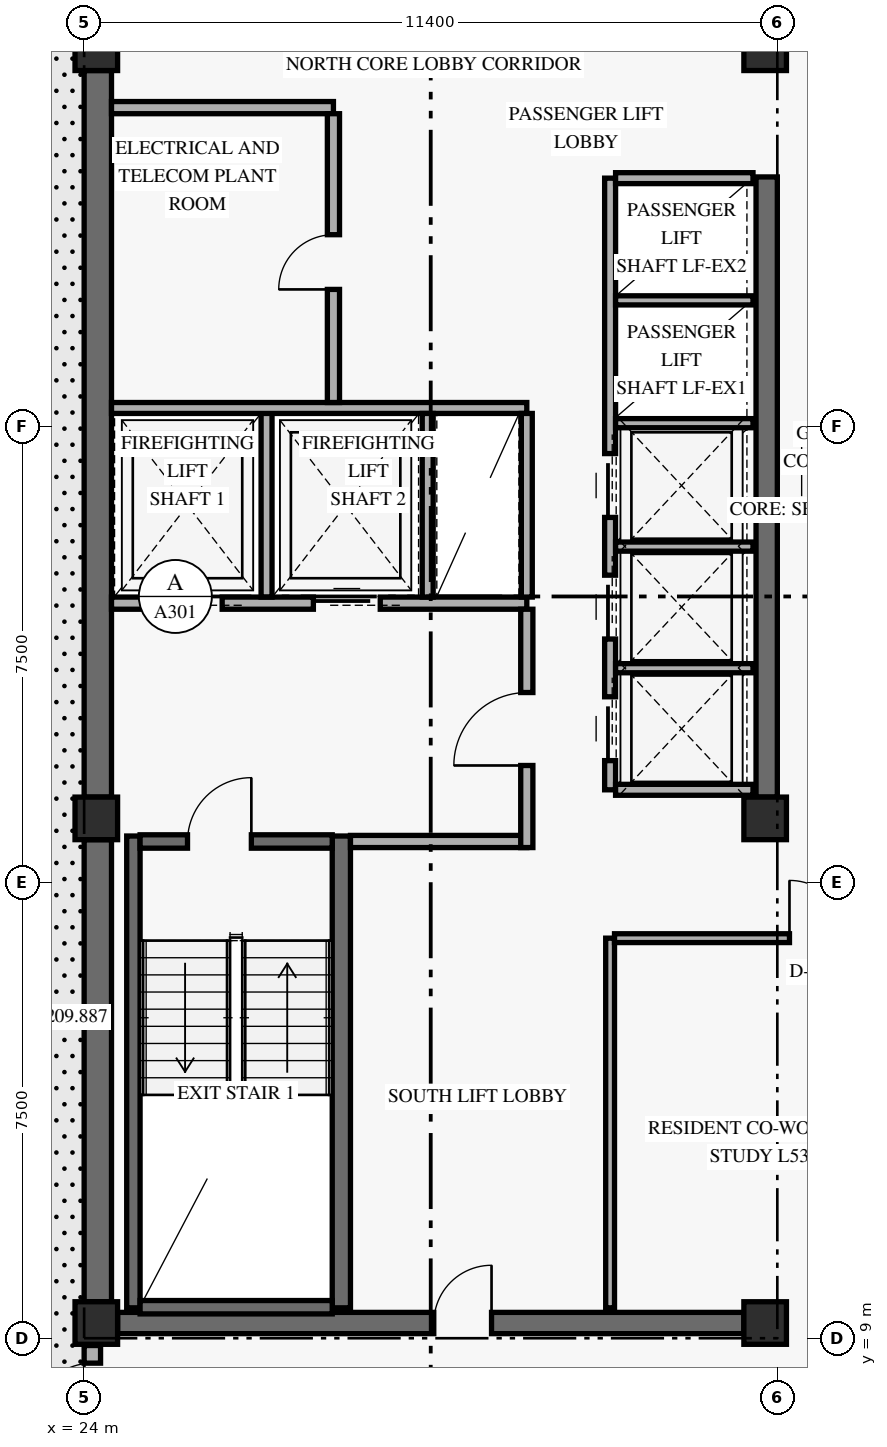
"""IFC4 building model, lengths in metres.
Left out: names, types, materials, properties, quantities, classifications, styles, units other than length and angle.
Written with IfcOpenShell. Run it as: python <this file> out.ifc"""

import sys

from ifc_helpers import new_model, si_unit, direction, frame, frame_2d, origin, origin_2d, place, context, subcontext, project, spatial, rectangle, extrude, element, fill, save


model = new_model("IFC4")
c1 = context("Model", 3, precision=1e-05, world=origin(), true_north=direction((0.0, 1.0)))
c2 = subcontext(c1, "Body", "Model", "MODEL_VIEW")
j1 = project(units=[si_unit("LENGTHUNIT", "METRE"), si_unit("PLANEANGLEUNIT", "RADIAN")], contexts=[c1])
p1 = place(None, origin())
s1 = spatial("IfcSite", under=j1, at=p1, CompositionType="ELEMENT")
p2 = place(p1, origin())
s2 = spatial("IfcBuilding", under=s1, at=p2, CompositionType="ELEMENT")
p3 = place(p2, frame((0.0, 0.0, 205.8)))
s3 = spatial("IfcBuildingStorey", under=s2, at=p3, CompositionType="ELEMENT", Elevation=205.8)
p4 = place(p3, frame((24.225, 9.6, 0.0), z_axis=(0.0, 0.0, 1.0), x_axis=(0.0, 1.0, 0.0)))
e1 = element("IfcWall", 1, at=p4, inside=s3, PredefinedType="SHEAR", context=c2, shape_type="SweptSolid", body=[
    extrude(rectangle(XDim=7.6, YDim=0.45, at=frame_2d((3.8, 0.0))), origin(), (0.0, 0.0, 1.0), 2.821),
])
p5 = place(p3, frame((24.225, 17.9, 0.0), z_axis=(0.0, 0.0, 1.0), x_axis=(0.0, 1.0, 0.0)))
e2 = element("IfcWall", 2, at=p5, inside=s3, PredefinedType="SHEAR", context=c2, shape_type="SweptSolid", body=[
    extrude(rectangle(XDim=11.95, YDim=0.45, at=frame_2d((5.975, 0.0))), origin(), (0.0, 0.0, 1.0), 2.821),
])
p6 = place(p3, frame((35.225, 17.9, 0.0), z_axis=(0.0, 0.0, 1.0), x_axis=(0.0, 1.0, 0.0)))
e3 = element("IfcWall", 3, at=p6, inside=s3, PredefinedType="SHEAR", context=c2, shape_type="SweptSolid", body=[
    extrude(rectangle(XDim=10.2, YDim=0.35, at=frame_2d((5.1, 0.0))), origin(), (0.0, 0.0, 1.0), 2.821),
])
p7 = place(p3, frame((24.55, 9.25, 0.0), z_axis=(0.0, 0.0, 1.0), x_axis=(1.0, 0.0, 0.0)))
e4 = element("IfcWall", 4, at=p7, inside=s3, PredefinedType="SHEAR", context=c2, shape_type="SweptSolid", body=[
    extrude(rectangle(XDim=10.3, YDim=0.35, at=frame_2d((5.15, 0.0))), origin(), (0.0, 0.0, 1.0), 3.36),
])
p8 = place(p7, frame((5.2, 0.0, 0.0)))
e5 = element("IfcOpeningElement", 5, at=p8, cuts=e4, PredefinedType="OPENING", context=c2, shape_type="SweptSolid", body=[
    extrude(rectangle(XDim=0.95, YDim=2.15, at=frame_2d((0.475, 1.075))), frame((0.0, 0.185, 0.0), z_axis=(0.0, -1.0, 0.0), x_axis=(1.0, 0.0, 0.0)), (0.0, 0.0, 1.0), 0.37),
])
p9 = place(p3, frame((24.81, 9.5, 0.0), z_axis=(0.0, 0.0, 1.0), x_axis=(0.0, 1.0, 0.0)))
e6 = element("IfcWall", 6, at=p9, inside=s3, PredefinedType="SHEAR", context=c2, shape_type="SweptSolid", body=[
    extrude(rectangle(XDim=7.76, YDim=0.22, at=frame_2d((3.88, 0.0))), origin(), (0.0, 0.0, 1.0), 3.36),
])
p10 = place(p3, frame((28.23, 9.5, 0.0), z_axis=(0.0, 0.0, 1.0), x_axis=(0.0, 1.0, 0.0)))
e7 = element("IfcWall", 7, at=p10, inside=s3, PredefinedType="SHEAR", context=c2, shape_type="SweptSolid", body=[
    extrude(rectangle(XDim=7.76, YDim=0.3, at=frame_2d((3.88, 0.0))), origin(), (0.0, 0.0, 1.0), 3.36),
])
p11 = place(p3, frame((24.92, 9.51, 0.0), z_axis=(0.0, 0.0, 1.0), x_axis=(1.0, 0.0, 0.0)))
e8 = element("IfcWall", 8, at=p11, inside=s3, PredefinedType="SHEAR", context=c2, shape_type="SweptSolid", body=[
    extrude(rectangle(XDim=3.16, YDim=0.22, at=frame_2d((1.58, 0.0))), origin(), (0.0, 0.0, 1.0), 3.36),
])
p12 = place(p3, frame((24.92, 17.17, 0.0), z_axis=(0.0, 0.0, 1.0), x_axis=(1.0, 0.0, 0.0)))
e9 = element("IfcWall", 9, at=p12, inside=s3, PredefinedType="SHEAR", context=c2, shape_type="SweptSolid", body=[
    extrude(rectangle(XDim=3.16, YDim=0.22, at=frame_2d((1.58, 0.0))), origin(), (0.0, 0.0, 1.0), 3.36),
])
p13 = place(p12, frame((0.78, 0.0, 0.0)))
e10 = element("IfcOpeningElement", 10, at=p13, cuts=e9, PredefinedType="OPENING", context=c2, shape_type="SweptSolid", body=[
    extrude(rectangle(XDim=1.05, YDim=2.15, at=frame_2d((0.525, 1.075))), frame((0.0, 0.12, 0.0), z_axis=(0.0, -1.0, 0.0), x_axis=(1.0, 0.0, 0.0)), (0.0, 0.0, 1.0), 0.24),
])
for number, where, z_axis, x_axis in (
    (11, (24.2, 9.25, 0.0), (0.0, 0.0, 1.0), (1.0, 0.0, 0.0)),
    (12, (24.2, 17.55, 0.0), (0.0, 0.0, 1.0), (1.0, 0.0, 0.0)),
    (13, (24.2, 30.2, 0.0), (0.0, 0.0, 1.0), (1.0, 0.0, 0.0)),
    (14, (35.2, 9.25, 0.0), (0.0, 0.0, 1.0), (1.0, 0.0, 0.0)),
    (15, (35.2, 17.55, 0.0), (0.0, 0.0, 1.0), (1.0, 0.0, 0.0)),
    (16, (35.2, 30.2, 0.0), (0.0, 0.0, 1.0), (1.0, 0.0, 0.0)),
):
    element("IfcColumn", number, at=place(p3, frame(where, z_axis=z_axis, x_axis=x_axis)), inside=s3, PredefinedType="COLUMN", context=c2, shape_type="SweptSolid", body=[
        extrude(rectangle(XDim=0.7, YDim=0.7, at=origin_2d()), origin(), (0.0, 0.0, 1.0), 3.6),
    ])
p14 = place(p3, frame((24.135, 7.32, 0.0), z_axis=(0.0, 0.0, 1.0), x_axis=(0.0, 1.0, 0.0)))
e17 = element("IfcWall", 17, at=p14, inside=s3, PredefinedType="SOLIDWALL", context=c2, shape_type="SweptSolid", body=[
    extrude(rectangle(XDim=1.56, YDim=0.27, at=frame_2d((0.78, 0.0))), origin(), (0.0, 0.0, 1.0), 2.803),
])
p15 = place(p14, frame((0.29, 0.0, 0.0)))
e18 = element("IfcOpeningElement", 18, at=p15, cuts=e17, PredefinedType="OPENING", context=c2, shape_type="SweptSolid", body=[
    extrude(rectangle(XDim=0.98, YDim=2.12, at=frame_2d((0.49, 1.06))), frame((0.0, 0.145, 0.0), z_axis=(0.0, -1.0, 0.0), x_axis=(1.0, 0.0, 0.0)), (0.0, 0.0, 1.0), 0.29),
])
p16 = place(p3, frame((24.45, 21.09, 0.0), z_axis=(0.0, 0.0, 1.0), x_axis=(1.0, 0.0, 0.0)))
e19 = element("IfcWall", 19, at=p16, inside=s3, PredefinedType="STANDARD", context=c2, shape_type="SweptSolid", body=[
    extrude(rectangle(XDim=6.83, YDim=0.2, at=frame_2d((3.415, 0.0))), origin(), (0.0, 0.0, 1.0), 3.36),
])
p17 = place(p16, frame((0.72, 0.0, 0.0)))
e20 = element("IfcOpeningElement", 20, at=p17, cuts=e19, PredefinedType="OPENING", context=c2, shape_type="SweptSolid", body=[
    extrude(rectangle(XDim=1.1, YDim=2.2, at=frame_2d((0.55, 1.1))), frame((0.0, 0.11, 0.0), z_axis=(0.0, -1.0, 0.0), x_axis=(1.0, 0.0, 0.0)), (0.0, 0.0, 1.0), 0.22),
])
p18 = place(p16, frame((3.32, 0.0, 0.0)))
e21 = element("IfcOpeningElement", 21, at=p18, cuts=e19, PredefinedType="OPENING", context=c2, shape_type="SweptSolid", body=[
    extrude(rectangle(XDim=1.1, YDim=2.2, at=frame_2d((0.55, 1.1))), frame((0.0, 0.11, 0.0), z_axis=(0.0, -1.0, 0.0), x_axis=(1.0, 0.0, 0.0)), (0.0, 0.0, 1.0), 0.22),
])
p19 = place(p3, frame((28.38, 17.17, 0.0), z_axis=(0.0, 0.0, 1.0), x_axis=(1.0, 0.0, 0.0)))
e22 = element("IfcWall", 22, at=p19, inside=s3, PredefinedType="STANDARD", context=c2, shape_type="SweptSolid", body=[
    extrude(rectangle(XDim=2.9, YDim=0.2, at=frame_2d((1.45, 0.0))), origin(), (0.0, 0.0, 1.0), 3.36),
])
p20 = place(p3, frame((31.28, 17.07, 0.0), z_axis=(0.0, 0.0, 1.0), x_axis=(0.0, 1.0, 0.0)))
e23 = element("IfcWall", 23, at=p20, inside=s3, PredefinedType="STANDARD", context=c2, shape_type="SweptSolid", body=[
    extrude(rectangle(XDim=3.92, YDim=0.2, at=frame_2d((1.96, 0.0))), origin(), (0.0, 0.0, 1.0), 2.803),
])
p21 = place(p20, frame((1.35, 0.0, 0.0)))
e24 = element("IfcOpeningElement", 24, at=p21, cuts=e23, PredefinedType="OPENING", context=c2, shape_type="SweptSolid", body=[
    extrude(rectangle(XDim=1.2, YDim=2.15, at=frame_2d((0.6, 1.075))), frame((0.0, 0.11, 0.0), z_axis=(0.0, -1.0, 0.0), x_axis=(1.0, 0.0, 0.0)), (0.0, 0.0, 1.0), 0.22),
])
p22 = place(p3, frame((27.0, 21.19, 0.0), z_axis=(0.0, 0.0, 1.0), x_axis=(0.0, 1.0, 0.0)))
e25 = element("IfcWall", 25, at=p22, inside=s3, PredefinedType="STANDARD", context=c2, shape_type="SweptSolid", body=[
    extrude(rectangle(XDim=3.11, YDim=0.18, at=frame_2d((1.555, 0.0))), origin(), (0.0, 0.0, 1.0), 3.36),
])
p23 = place(p3, frame((24.45, 24.3, 0.0), z_axis=(0.0, 0.0, 1.0), x_axis=(1.0, 0.0, 0.0)))
e26 = element("IfcWall", 26, at=p23, inside=s3, PredefinedType="STANDARD", context=c2, shape_type="SweptSolid", body=[
    extrude(rectangle(XDim=6.83, YDim=0.18, at=frame_2d((3.415, 0.0))), origin(), (0.0, 0.0, 1.0), 3.36),
])
for number, where, z_axis, x_axis in (
    (27, (29.65, 21.19, 0.0), (0.0, 0.0, 1.0), (0.0, 1.0, 0.0)),
    (28, (31.28, 21.19, 0.0), (0.0, 0.0, 1.0), (0.0, 1.0, 0.0)),
):
    element("IfcWall", number, at=place(p3, frame(where, z_axis=z_axis, x_axis=x_axis)), inside=s3, PredefinedType="STANDARD", context=c2, shape_type="SweptSolid", body=[
        extrude(rectangle(XDim=3.02, YDim=0.18, at=frame_2d((1.51, 0.0))), origin(), (0.0, 0.0, 1.0), 3.36),
    ])
p24 = place(p3, frame((24.45, 29.24, 0.0), z_axis=(0.0, 0.0, 1.0), x_axis=(1.0, 0.0, 0.0)))
e29 = element("IfcWall", 29, at=p24, inside=s3, PredefinedType="STANDARD", context=c2, shape_type="SweptSolid", body=[
    extrude(rectangle(XDim=3.65, YDim=0.2, at=frame_2d((1.825, 0.0))), origin(), (0.0, 0.0, 1.0), 3.36),
])
p25 = place(p3, frame((28.1, 24.39, 0.0), z_axis=(0.0, 0.0, 1.0), x_axis=(0.0, 1.0, 0.0)))
e30 = element("IfcWall", 30, at=p25, inside=s3, PredefinedType="STANDARD", context=c2, shape_type="SweptSolid", body=[
    extrude(rectangle(XDim=4.75, YDim=0.2, at=frame_2d((2.375, 0.0))), origin(), (0.0, 0.0, 1.0), 3.36),
])
p26 = place(p25, frame((1.86, 0.0, 0.0)))
e31 = element("IfcOpeningElement", 31, at=p26, cuts=e30, PredefinedType="OPENING", context=c2, shape_type="SweptSolid", body=[
    extrude(rectangle(XDim=0.9, YDim=2.1, at=frame_2d((0.45, 1.05))), frame((0.0, 0.11, 0.0), z_axis=(0.0, -1.0, 0.0), x_axis=(1.0, 0.0, 0.0)), (0.0, 0.0, 1.0), 0.22),
])
p27 = place(p3, frame((32.65, 18.02, 0.0), z_axis=(0.0, 0.0, 1.0), x_axis=(0.0, 1.0, 0.0)))
e32 = element("IfcWall", 32, at=p27, inside=s3, PredefinedType="STANDARD", context=c2, shape_type="SweptSolid", body=[
    extrude(rectangle(XDim=10.06, YDim=0.18, at=frame_2d((5.03, 0.0))), origin(), (0.0, 0.0, 1.0), 3.36),
])
p28 = place(p27, frame((0.48, 0.0, 0.0)))
e33 = element("IfcOpeningElement", 33, at=p28, cuts=e32, PredefinedType="OPENING", context=c2, shape_type="SweptSolid", body=[
    extrude(rectangle(XDim=1.05, YDim=2.2, at=frame_2d((0.525, 1.1))), frame((0.0, 0.1, 0.0), z_axis=(0.0, -1.0, 0.0), x_axis=(1.0, 0.0, 0.0)), (0.0, 0.0, 1.0), 0.2),
])
p29 = place(p27, frame((2.48, 0.0, 0.0)))
e34 = element("IfcOpeningElement", 34, at=p29, cuts=e32, PredefinedType="OPENING", context=c2, shape_type="SweptSolid", body=[
    extrude(rectangle(XDim=1.05, YDim=2.2, at=frame_2d((0.525, 1.1))), frame((0.0, 0.1, 0.0), z_axis=(0.0, -1.0, 0.0), x_axis=(1.0, 0.0, 0.0)), (0.0, 0.0, 1.0), 0.2),
])
p30 = place(p27, frame((4.48, 0.0, 0.0)))
e35 = element("IfcOpeningElement", 35, at=p30, cuts=e32, PredefinedType="OPENING", context=c2, shape_type="SweptSolid", body=[
    extrude(rectangle(XDim=1.05, YDim=2.2, at=frame_2d((0.525, 1.1))), frame((0.0, 0.1, 0.0), z_axis=(0.0, -1.0, 0.0), x_axis=(1.0, 0.0, 0.0)), (0.0, 0.0, 1.0), 0.2),
])
for number, where, z_axis, x_axis in (
    (36, (32.74, 18.02, 0.0), (0.0, 0.0, 1.0), (1.0, 0.0, 0.0)),
    (37, (32.74, 28.08, 0.0), (0.0, 0.0, 1.0), (1.0, 0.0, 0.0)),
):
    element("IfcWall", number, at=place(p3, frame(where, z_axis=z_axis, x_axis=x_axis)), inside=s3, PredefinedType="STANDARD", context=c2, shape_type="SweptSolid", body=[
        extrude(rectangle(XDim=2.26, YDim=0.18, at=frame_2d((1.13, 0.0))), origin(), (0.0, 0.0, 1.0), 3.36),
    ])
for number, where, z_axis, x_axis in (
    (38, (32.74, 20.02, 0.0), (0.0, 0.0, 1.0), (1.0, 0.0, 0.0)),
    (39, (32.74, 22.02, 0.0), (0.0, 0.0, 1.0), (1.0, 0.0, 0.0)),
    (40, (32.74, 24.05, 0.0), (0.0, 0.0, 1.0), (1.0, 0.0, 0.0)),
    (41, (32.74, 26.07, 0.0), (0.0, 0.0, 1.0), (1.0, 0.0, 0.0)),
):
    element("IfcWall", number, at=place(p3, frame(where, z_axis=z_axis, x_axis=x_axis)), inside=s3, PredefinedType="STANDARD", context=c2, shape_type="SweptSolid", body=[
        extrude(rectangle(XDim=2.26, YDim=0.15, at=frame_2d((1.13, 0.0))), origin(), (0.0, 0.0, 1.0), 3.36),
    ])
p31 = place(p3, frame((32.65, 9.5, 0.0), z_axis=(0.0, 0.0, 1.0), x_axis=(0.0, 1.0, 0.0)))
e42 = element("IfcWall", 42, at=p31, inside=s3, PredefinedType="PARTITIONING", context=c2, shape_type="SweptSolid", body=[
    extrude(rectangle(XDim=6.08, YDim=0.145, at=frame_2d((3.04, 0.0))), origin(), (0.0, 0.0, 1.0), 3.36),
])
p32 = place(p3, frame((32.722, 15.58, 0.0), z_axis=(0.0, 0.0, 1.0), x_axis=(1.0, 0.0, 0.0)))
e43 = element("IfcWall", 43, at=p32, inside=s3, PredefinedType="PARTITIONING", context=c2, shape_type="SweptSolid", body=[
    extrude(rectangle(XDim=4.828, YDim=0.145, at=frame_2d((2.414, 0.0))), origin(), (0.0, 0.0, 1.0), 2.803),
])
p33 = place(p32, frame((2.877, 0.0, 0.0)))
e44 = element("IfcOpeningElement", 44, at=p33, cuts=e43, PredefinedType="OPENING", context=c2, shape_type="SweptSolid", body=[
    extrude(rectangle(XDim=0.95, YDim=2.15, at=frame_2d((0.475, 1.075))), frame((0.0, 0.083, 0.0), z_axis=(0.0, -1.0, 0.0), x_axis=(1.0, 0.0, 0.0)), (0.0, 0.0, 1.0), 0.165),
])
p34 = place(p15, origin())
e45 = element("IfcDoor", 45, at=p34, inside=s3, OperationType="SINGLE_SWING_LEFT", PredefinedType="DOOR", context=c2, shape_type="SweptSolid", body=[
    extrude(rectangle(XDim=0.98, YDim=2.12, at=frame_2d((0.49, 1.06))), frame((0.0, 0.025, 0.0), z_axis=(0.0, -1.0, 0.0), x_axis=(1.0, 0.0, 0.0)), (0.0, 0.0, 1.0), 0.05),
])
fill(e18, e45)
p35 = place(p13, frame((1.05, 0.0, 0.0), z_axis=(0.0, 0.0, 1.0), x_axis=(-1.0, 0.0, 0.0)))
e46 = element("IfcDoor", 46, at=p35, inside=s3, OperationType="SINGLE_SWING_LEFT", PredefinedType="DOOR", context=c2, shape_type="SweptSolid", body=[
    extrude(rectangle(XDim=1.05, YDim=2.15, at=frame_2d((0.525, 1.075))), frame((0.0, 0.025, 0.0), z_axis=(0.0, -1.0, 0.0), x_axis=(1.0, 0.0, 0.0)), (0.0, 0.0, 1.0), 0.05),
])
fill(e10, e46)
p36 = place(p17, origin())
e47 = element("IfcDoor", 47, at=p36, inside=s3, OperationType="SLIDING_TO_LEFT", PredefinedType="DOOR", context=c2, shape_type="SweptSolid", body=[
    extrude(rectangle(XDim=1.1, YDim=2.2, at=frame_2d((0.55, 1.1))), frame((0.0, 0.025, 0.0), z_axis=(0.0, -1.0, 0.0), x_axis=(1.0, 0.0, 0.0)), (0.0, 0.0, 1.0), 0.05),
])
fill(e20, e47)
p37 = place(p18, origin())
e48 = element("IfcDoor", 48, at=p37, inside=s3, OperationType="SLIDING_TO_LEFT", PredefinedType="DOOR", context=c2, shape_type="SweptSolid", body=[
    extrude(rectangle(XDim=1.1, YDim=2.2, at=frame_2d((0.55, 1.1))), frame((0.0, 0.025, 0.0), z_axis=(0.0, -1.0, 0.0), x_axis=(1.0, 0.0, 0.0)), (0.0, 0.0, 1.0), 0.05),
])
fill(e21, e48)
p38 = place(p21, origin())
e49 = element("IfcDoor", 49, at=p38, inside=s3, OperationType="SINGLE_SWING_LEFT", PredefinedType="DOOR", context=c2, shape_type="SweptSolid", body=[
    extrude(rectangle(XDim=1.2, YDim=2.15, at=frame_2d((0.6, 1.075))), frame((0.0, 0.025, 0.0), z_axis=(0.0, -1.0, 0.0), x_axis=(1.0, 0.0, 0.0)), (0.0, 0.0, 1.0), 0.05),
])
fill(e24, e49)
p39 = place(p26, origin())
e50 = element("IfcDoor", 50, at=p39, inside=s3, OperationType="SINGLE_SWING_LEFT", PredefinedType="DOOR", context=c2, shape_type="SweptSolid", body=[
    extrude(rectangle(XDim=0.9, YDim=2.1, at=frame_2d((0.45, 1.05))), frame((0.0, 0.025, 0.0), z_axis=(0.0, -1.0, 0.0), x_axis=(1.0, 0.0, 0.0)), (0.0, 0.0, 1.0), 0.05),
])
fill(e31, e50)
p40 = place(p28, origin())
e51 = element("IfcDoor", 51, at=p40, inside=s3, OperationType="SLIDING_TO_LEFT", PredefinedType="DOOR", context=c2, shape_type="SweptSolid", body=[
    extrude(rectangle(XDim=1.05, YDim=2.2, at=frame_2d((0.525, 1.1))), frame((0.0, 0.025, 0.0), z_axis=(0.0, -1.0, 0.0), x_axis=(1.0, 0.0, 0.0)), (0.0, 0.0, 1.0), 0.05),
])
fill(e33, e51)
p41 = place(p29, origin())
e52 = element("IfcDoor", 52, at=p41, inside=s3, OperationType="SLIDING_TO_LEFT", PredefinedType="DOOR", context=c2, shape_type="SweptSolid", body=[
    extrude(rectangle(XDim=1.05, YDim=2.2, at=frame_2d((0.525, 1.1))), frame((0.0, 0.025, 0.0), z_axis=(0.0, -1.0, 0.0), x_axis=(1.0, 0.0, 0.0)), (0.0, 0.0, 1.0), 0.05),
])
fill(e34, e52)
p42 = place(p30, origin())
e53 = element("IfcDoor", 53, at=p42, inside=s3, OperationType="SLIDING_TO_LEFT", PredefinedType="DOOR", context=c2, shape_type="SweptSolid", body=[
    extrude(rectangle(XDim=1.05, YDim=2.2, at=frame_2d((0.525, 1.1))), frame((0.0, 0.025, 0.0), z_axis=(0.0, -1.0, 0.0), x_axis=(1.0, 0.0, 0.0)), (0.0, 0.0, 1.0), 0.05),
])
fill(e35, e53)
p43 = place(p33, origin())
e54 = element("IfcDoor", 54, at=p43, inside=s3, OperationType="SINGLE_SWING_LEFT", PredefinedType="DOOR", context=c2, shape_type="SweptSolid", body=[
    extrude(rectangle(XDim=0.95, YDim=2.15, at=frame_2d((0.475, 1.075))), frame((0.0, 0.025, 0.0), z_axis=(0.0, -1.0, 0.0), x_axis=(1.0, 0.0, 0.0)), (0.0, 0.0, 1.0), 0.05),
])
fill(e44, e54)
p44 = place(p8, frame((0.95, 0.0, 0.0), z_axis=(0.0, 0.0, 1.0), x_axis=(-1.0, 0.0, 0.0)))
e55 = element("IfcDoor", 55, at=p44, inside=s3, OperationType="SINGLE_SWING_LEFT", PredefinedType="DOOR", context=c2, shape_type="SweptSolid", body=[
    extrude(rectangle(XDim=0.95, YDim=2.15, at=frame_2d((0.475, 1.075))), frame((0.0, 0.025, 0.0), z_axis=(0.0, -1.0, 0.0), x_axis=(1.0, 0.0, 0.0)), (0.0, 0.0, 1.0), 0.05),
])
fill(e5, e55)
save(model, sys.argv[1])
